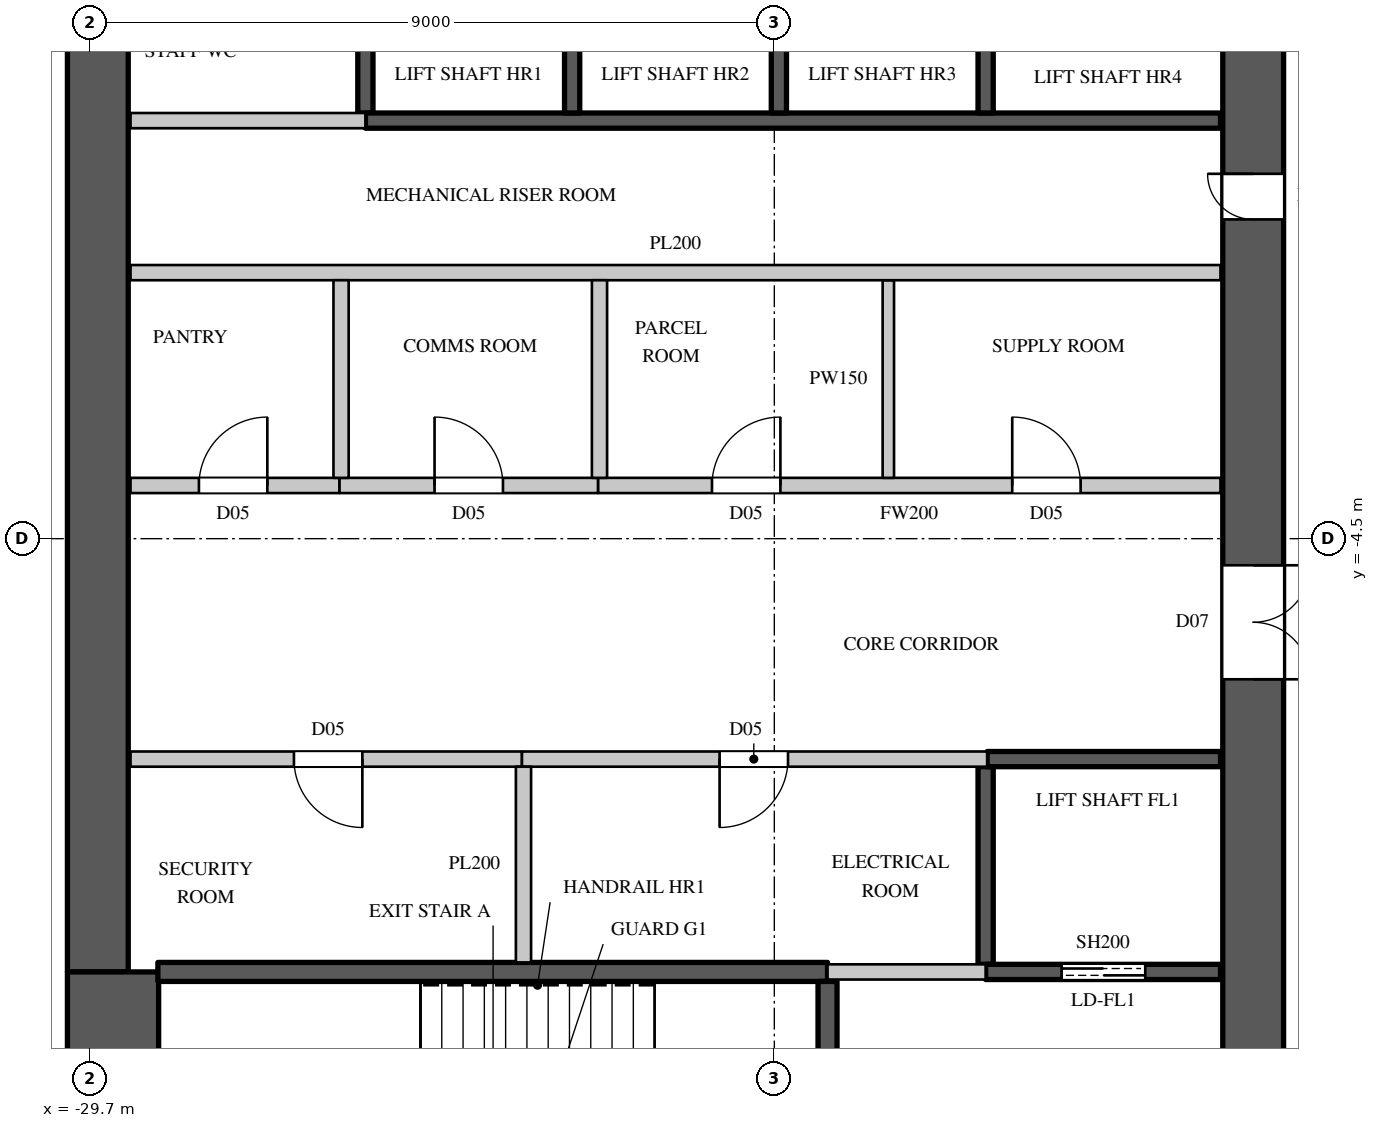
"""IFC4 building model, lengths in metres.
Left out: names, types, materials, properties, quantities, classifications, styles, units other than length and angle.
Written with IfcOpenShell. Run it as: python <this file> out.ifc"""

import sys

from ifc_helpers import new_model, si_unit, direction, frame, frame_2d, origin, place, context, subcontext, project, spatial, rectangle, extrude, element, fill, save


model = new_model("IFC4")
c1 = context("Model", 3, precision=1e-05, world=origin(), true_north=direction((0.0, 1.0)))
c2 = subcontext(c1, "Body", "Model", "MODEL_VIEW")
j1 = project(units=[si_unit("LENGTHUNIT", "METRE"), si_unit("PLANEANGLEUNIT", "RADIAN")], contexts=[c1])
p1 = place(None, origin())
s1 = spatial("IfcSite", under=j1, at=p1, CompositionType="ELEMENT")
p2 = place(p1, origin())
s2 = spatial("IfcBuilding", under=s1, at=p2, CompositionType="ELEMENT")
p3 = place(p2, frame((0.0, 0.0, 193.3)))
s3 = spatial("IfcBuildingStorey", under=s2, at=p3, CompositionType="ELEMENT", Elevation=193.3)
p4 = place(p3, frame((-14.4, -14.8, 0.0), z_axis=(0.0, 0.0, 1.0), x_axis=(0.0, 1.0, 0.0)))
e1 = element("IfcWall", 1, at=p4, inside=s3, PredefinedType="SHEAR", context=c2, shape_type="SweptSolid", body=[
    extrude(rectangle(XDim=29.6, YDim=0.8, at=frame_2d((14.8, 0.0))), origin(), (0.0, 0.0, 1.0), 4.1),
])
p5 = place(p4, frame((1.55, 0.0, 0.0)))
e2 = element("IfcOpeningElement", 2, at=p5, cuts=e1, PredefinedType="OPENING", context=c2, shape_type="SweptSolid", body=[
    extrude(rectangle(XDim=1.5, YDim=2.4, at=frame_2d((0.75, 1.2))), frame((0.0, 0.41, 0.0), z_axis=(0.0, -1.0, 0.0), x_axis=(1.0, 0.0, 0.0)), (0.0, 0.0, 1.0), 0.82),
])
p6 = place(p4, frame((26.55, 0.0, 0.0)))
e3 = element("IfcOpeningElement", 3, at=p6, cuts=e1, PredefinedType="OPENING", context=c2, shape_type="SweptSolid", body=[
    extrude(rectangle(XDim=1.5, YDim=2.4, at=frame_2d((0.75, 1.2))), frame((0.0, 0.41, 0.0), z_axis=(0.0, -1.0, 0.0), x_axis=(1.0, 0.0, 0.0)), (0.0, 0.0, 1.0), 0.82),
])
p7 = place(p4, frame((8.45, 0.0, 0.0)))
e4 = element("IfcOpeningElement", 4, at=p7, cuts=e1, PredefinedType="OPENING", context=c2, shape_type="SweptSolid", body=[
    extrude(rectangle(XDim=1.5, YDim=2.4, at=frame_2d((0.75, 1.2))), frame((0.0, 0.41, 0.0), z_axis=(0.0, -1.0, 0.0), x_axis=(1.0, 0.0, 0.0)), (0.0, 0.0, 1.0), 0.82),
])
p8 = place(p4, frame((19.65, 0.0, 0.0)))
e5 = element("IfcOpeningElement", 5, at=p8, cuts=e1, PredefinedType="OPENING", context=c2, shape_type="SweptSolid", body=[
    extrude(rectangle(XDim=1.5, YDim=2.4, at=frame_2d((0.75, 1.2))), frame((0.0, 0.41, 0.0), z_axis=(0.0, -1.0, 0.0), x_axis=(1.0, 0.0, 0.0)), (0.0, 0.0, 1.0), 0.82),
])
p9 = place(p4, frame((14.5, 0.0, 0.0)))
e6 = element("IfcOpeningElement", 6, at=p9, cuts=e1, PredefinedType="OPENING", context=c2, shape_type="SweptSolid", body=[
    extrude(rectangle(XDim=0.6, YDim=2.0, at=frame_2d((0.3, 1.0))), frame((0.0, 0.41, 0.0), z_axis=(0.0, -1.0, 0.0), x_axis=(1.0, 0.0, 0.0)), (0.0, 0.0, 1.0), 0.82),
])
p10 = place(p3, frame((-29.6, -10.2, 0.0), z_axis=(0.0, 0.0, 1.0), x_axis=(0.0, 1.0, 0.0)))
e7 = element("IfcWall", 7, at=p10, inside=s3, PredefinedType="SHEAR", context=c2, shape_type="SweptSolid", body=[
    extrude(rectangle(XDim=20.4, YDim=0.8, at=frame_2d((10.2, 0.0))), origin(), (0.0, 0.0, 1.0), 4.1),
])
p11 = place(p3, frame((-29.4, -14.8, 0.0), z_axis=(0.0, 0.0, 1.0), x_axis=(0.0, 1.0, 0.0)))
e8 = element("IfcWall", 8, at=p11, inside=s3, PredefinedType="SHEAR", context=c2, shape_type="SweptSolid", body=[
    extrude(rectangle(XDim=4.6, YDim=1.2, at=frame_2d((2.3, 0.0))), origin(), (0.0, 0.0, 1.0), 4.1),
])
p12 = place(p3, frame((-29.17, -7.4, 0.0), z_axis=(0.0, 0.0, 1.0), x_axis=(1.0, 0.0, 0.0)))
e9 = element("IfcWall", 9, at=p12, inside=s3, PredefinedType="PARTITIONING", context=c2, shape_type="SweptSolid", body=[
    extrude(rectangle(XDim=5.15, YDim=0.2, at=frame_2d((2.575, 0.0))), origin(), (0.0, 0.0, 1.0), 3.8),
])
p13 = place(p12, frame((2.15, 0.0, 0.0)))
e10 = element("IfcOpeningElement", 10, at=p13, cuts=e9, PredefinedType="OPENING", context=c2, shape_type="SweptSolid", body=[
    extrude(rectangle(XDim=0.9, YDim=2.2, at=frame_2d((0.45, 1.1))), frame((0.0, 0.11, 0.0), z_axis=(0.0, -1.0, 0.0), x_axis=(1.0, 0.0, 0.0)), (0.0, 0.0, 1.0), 0.22),
])
p14 = place(p3, frame((-29.17, -3.8, 0.0), z_axis=(0.0, 0.0, 1.0), x_axis=(1.0, 0.0, 0.0)))
e11 = element("IfcWall", 11, at=p14, inside=s3, PredefinedType="PARTITIONING", context=c2, shape_type="SweptSolid", body=[
    extrude(rectangle(XDim=2.75, YDim=0.2, at=frame_2d((1.375, 0.0))), origin(), (0.0, 0.0, 1.0), 3.8),
])
p15 = place(p14, frame((0.9, 0.0, 0.0)))
e12 = element("IfcOpeningElement", 12, at=p15, cuts=e11, PredefinedType="OPENING", context=c2, shape_type="SweptSolid", body=[
    extrude(rectangle(XDim=0.9, YDim=2.2, at=frame_2d((0.45, 1.1))), frame((0.0, 0.11, 0.0), z_axis=(0.0, -1.0, 0.0), x_axis=(1.0, 0.0, 0.0)), (0.0, 0.0, 1.0), 0.22),
])
p16 = place(p3, frame((-23.02, -3.8, 0.0), z_axis=(0.0, 0.0, 1.0), x_axis=(1.0, 0.0, 0.0)))
e13 = element("IfcWall", 13, at=p16, inside=s3, PredefinedType="PARTITIONING", context=c2, shape_type="SweptSolid", body=[
    extrude(rectangle(XDim=8.19, YDim=0.2, at=frame_2d((4.095, 0.0))), origin(), (0.0, 0.0, 1.0), 3.8),
])
p17 = place(p16, frame((1.5, 0.0, 0.0)))
e14 = element("IfcOpeningElement", 14, at=p17, cuts=e13, PredefinedType="OPENING", context=c2, shape_type="SweptSolid", body=[
    extrude(rectangle(XDim=0.9, YDim=2.2, at=frame_2d((0.45, 1.1))), frame((0.0, 0.11, 0.0), z_axis=(0.0, -1.0, 0.0), x_axis=(1.0, 0.0, 0.0)), (0.0, 0.0, 1.0), 0.22),
])
p18 = place(p16, frame((5.45, 0.0, 0.0)))
e15 = element("IfcOpeningElement", 15, at=p18, cuts=e13, PredefinedType="OPENING", context=c2, shape_type="SweptSolid", body=[
    extrude(rectangle(XDim=0.9, YDim=2.2, at=frame_2d((0.45, 1.1))), frame((0.0, 0.11, 0.0), z_axis=(0.0, -1.0, 0.0), x_axis=(1.0, 0.0, 0.0)), (0.0, 0.0, 1.0), 0.22),
])
p19 = place(p3, frame((-19.2, -3.7, 0.0), z_axis=(0.0, 0.0, 1.0), x_axis=(0.0, 1.0, 0.0)))
e16 = element("IfcWall", 16, at=p19, inside=s3, PredefinedType="PARTITIONING", context=c2, shape_type="SweptSolid", body=[
    extrude(rectangle(XDim=2.6, YDim=0.15, at=frame_2d((1.3, 0.0))), origin(), (0.0, 0.0, 1.0), 3.8),
])
p20 = place(p3, frame((-29.17, -1.0, 0.0), z_axis=(0.0, 0.0, 1.0), x_axis=(1.0, 0.0, 0.0)))
e17 = element("IfcWall", 17, at=p20, inside=s3, PredefinedType="PARTITIONING", context=c2, shape_type="SweptSolid", body=[
    extrude(rectangle(XDim=14.34, YDim=0.2, at=frame_2d((7.17, 0.0))), origin(), (0.0, 0.0, 1.0), 3.8),
])
p21 = place(p3, frame((-29.17, 1.0, 0.0), z_axis=(0.0, 0.0, 1.0), x_axis=(1.0, 0.0, 0.0)))
e18 = element("IfcWall", 18, at=p21, inside=s3, PredefinedType="PARTITIONING", context=c2, shape_type="SweptSolid", body=[
    extrude(rectangle(XDim=3.09, YDim=0.2, at=frame_2d((1.545, 0.0))), origin(), (0.0, 0.0, 1.0), 3.8),
])
p22 = place(p3, frame((-26.42, -3.8, 0.0), z_axis=(0.0, 0.0, 1.0), x_axis=(1.0, 0.0, 0.0)))
e19 = element("IfcWall", 19, at=p22, inside=s3, PredefinedType="PARTITIONING", context=c2, shape_type="SweptSolid", body=[
    extrude(rectangle(XDim=3.4, YDim=0.2, at=frame_2d((1.7, 0.0))), origin(), (0.0, 0.0, 1.0), 3.8),
])
p23 = place(p22, frame((1.25, 0.0, 0.0)))
e20 = element("IfcOpeningElement", 20, at=p23, cuts=e19, PredefinedType="OPENING", context=c2, shape_type="SweptSolid", body=[
    extrude(rectangle(XDim=0.9, YDim=2.2, at=frame_2d((0.45, 1.1))), frame((0.0, 0.11, 0.0), z_axis=(0.0, -1.0, 0.0), x_axis=(1.0, 0.0, 0.0)), (0.0, 0.0, 1.0), 0.22),
])
p24 = place(p3, frame((-26.4, -3.7, 0.0), z_axis=(0.0, 0.0, 1.0), x_axis=(0.0, 1.0, 0.0)))
e21 = element("IfcWall", 21, at=p24, inside=s3, PredefinedType="PARTITIONING", context=c2, shape_type="SweptSolid", body=[
    extrude(rectangle(XDim=2.6, YDim=0.2, at=frame_2d((1.3, 0.0))), origin(), (0.0, 0.0, 1.0), 3.8),
])
p25 = place(p3, frame((-24.02, -7.4, 0.0), z_axis=(0.0, 0.0, 1.0), x_axis=(1.0, 0.0, 0.0)))
e22 = element("IfcWall", 22, at=p25, inside=s3, PredefinedType="PARTITIONING", context=c2, shape_type="SweptSolid", body=[
    extrude(rectangle(XDim=6.12, YDim=0.2, at=frame_2d((3.06, 0.0))), origin(), (0.0, 0.0, 1.0), 3.8),
])
p26 = place(p25, frame((2.6, 0.0, 0.0)))
e23 = element("IfcOpeningElement", 23, at=p26, cuts=e22, PredefinedType="OPENING", context=c2, shape_type="SweptSolid", body=[
    extrude(rectangle(XDim=0.9, YDim=2.2, at=frame_2d((0.45, 1.1))), frame((0.0, 0.11, 0.0), z_axis=(0.0, -1.0, 0.0), x_axis=(1.0, 0.0, 0.0)), (0.0, 0.0, 1.0), 0.22),
])
p27 = place(p3, frame((-24.0, -10.075, 0.0), z_axis=(0.0, 0.0, 1.0), x_axis=(0.0, 1.0, 0.0)))
e24 = element("IfcWall", 24, at=p27, inside=s3, PredefinedType="PARTITIONING", context=c2, shape_type="SweptSolid", body=[
    extrude(rectangle(XDim=2.575, YDim=0.2, at=frame_2d((1.288, 0.0))), origin(), (0.0, 0.0, 1.0), 3.8),
])
p28 = place(p3, frame((-23.0, -3.7, 0.0), z_axis=(0.0, 0.0, 1.0), x_axis=(0.0, 1.0, 0.0)))
e25 = element("IfcWall", 25, at=p28, inside=s3, PredefinedType="PARTITIONING", context=c2, shape_type="SweptSolid", body=[
    extrude(rectangle(XDim=2.6, YDim=0.2, at=frame_2d((1.3, 0.0))), origin(), (0.0, 0.0, 1.0), 3.8),
])
p29 = place(p3, frame((-20.0, -10.2, 0.0), z_axis=(0.0, 0.0, 1.0), x_axis=(1.0, 0.0, 0.0)))
e26 = element("IfcWall", 26, at=p29, inside=s3, PredefinedType="PARTITIONING", context=c2, shape_type="SweptSolid", body=[
    extrude(rectangle(XDim=2.08, YDim=0.2, at=frame_2d((1.04, 0.0))), origin(), (0.0, 0.0, 1.0), 3.8),
])
p30 = place(p3, frame((-26.08, 1.1, 0.0), z_axis=(0.0, 0.0, 1.0), x_axis=(0.0, 1.0, 0.0)))
e27 = element("IfcWall", 27, at=p30, inside=s3, PredefinedType="SHEAR", context=c2, shape_type="SweptSolid", body=[
    extrude(rectangle(XDim=2.6, YDim=0.2, at=frame_2d((1.3, 0.0))), origin(), (0.0, 0.0, 1.0), 3.8),
])
p31 = place(p3, frame((-26.08, 1.0, 0.0), z_axis=(0.0, 0.0, 1.0), x_axis=(1.0, 0.0, 0.0)))
e28 = element("IfcWall", 28, at=p31, inside=s3, PredefinedType="SHEAR", context=c2, shape_type="SweptSolid", body=[
    extrude(rectangle(XDim=11.25, YDim=0.2, at=frame_2d((5.625, 0.0))), origin(), (0.0, 0.0, 1.0), 3.8),
])
for number, where, z_axis, x_axis in (
    (29, (-23.36, 1.1, 0.0), (0.0, 0.0, 1.0), (0.0, 1.0, 0.0)),
    (30, (-20.64, 1.1, 0.0), (0.0, 0.0, 1.0), (0.0, 1.0, 0.0)),
):
    element("IfcWall", number, at=place(p3, frame(where, z_axis=z_axis, x_axis=x_axis)), inside=s3, PredefinedType="SHEAR", context=c2, shape_type="SweptSolid", body=[
        extrude(rectangle(XDim=2.6, YDim=0.2, at=frame_2d((1.3, 0.0))), origin(), (0.0, 0.0, 1.0), 4.1),
    ])
p32 = place(p3, frame((-17.92, -10.1, 0.0), z_axis=(0.0, 0.0, 1.0), x_axis=(0.0, 1.0, 0.0)))
e31 = element("IfcWall", 31, at=p32, inside=s3, PredefinedType="SHEAR", context=c2, shape_type="SweptSolid", body=[
    extrude(rectangle(XDim=2.6, YDim=0.2, at=frame_2d((1.3, 0.0))), origin(), (0.0, 0.0, 1.0), 3.8),
])
p33 = place(p3, frame((-17.92, -10.2, 0.0), z_axis=(0.0, 0.0, 1.0), x_axis=(1.0, 0.0, 0.0)))
e32 = element("IfcWall", 32, at=p33, inside=s3, PredefinedType="SHEAR", context=c2, shape_type="SweptSolid", body=[
    extrude(rectangle(XDim=3.09, YDim=0.2, at=frame_2d((1.545, 0.0))), origin(), (0.0, 0.0, 1.0), 3.8),
])
p34 = place(p33, frame((1.0, 0.0, 0.0)))
e33 = element("IfcOpeningElement", 33, at=p34, cuts=e32, PredefinedType="OPENING", context=c2, shape_type="SweptSolid", body=[
    extrude(rectangle(XDim=1.1, YDim=2.2, at=frame_2d((0.55, 1.1))), frame((0.0, 0.11, 0.0), z_axis=(0.0, -1.0, 0.0), x_axis=(1.0, 0.0, 0.0)), (0.0, 0.0, 1.0), 0.22),
])
p35 = place(p3, frame((-17.9, -7.4, 0.0), z_axis=(0.0, 0.0, 1.0), x_axis=(1.0, 0.0, 0.0)))
e34 = element("IfcWall", 34, at=p35, inside=s3, PredefinedType="SHEAR", context=c2, shape_type="SweptSolid", body=[
    extrude(rectangle(XDim=3.07, YDim=0.2, at=frame_2d((1.535, 0.0))), origin(), (0.0, 0.0, 1.0), 3.8),
])
p36 = place(p3, frame((-17.92, 1.1, 0.0), z_axis=(0.0, 0.0, 1.0), x_axis=(0.0, 1.0, 0.0)))
e35 = element("IfcWall", 35, at=p36, inside=s3, PredefinedType="SHEAR", context=c2, shape_type="SweptSolid", body=[
    extrude(rectangle(XDim=2.6, YDim=0.2, at=frame_2d((1.3, 0.0))), origin(), (0.0, 0.0, 1.0), 4.1),
])
p37 = place(p3, frame((-28.81, -10.2, 0.0), z_axis=(0.0, 0.0, 1.0), x_axis=(1.0, 0.0, 0.0)))
e36 = element("IfcWall", 36, at=p37, inside=s3, PredefinedType="SHEAR", context=c2, shape_type="SweptSolid", body=[
    extrude(rectangle(XDim=8.81, YDim=0.25, at=frame_2d((4.405, 0.0))), origin(), (0.0, 0.0, 1.0), 3.8),
])
p38 = place(p3, frame((-20.0, -14.77, 0.0), z_axis=(0.0, 0.0, 1.0), x_axis=(0.0, 1.0, 0.0)))
e37 = element("IfcWall", 37, at=p38, inside=s3, PredefinedType="SHEAR", context=c2, shape_type="SweptSolid", body=[
    extrude(rectangle(XDim=4.445, YDim=0.25, at=frame_2d((2.223, 0.0))), origin(), (0.0, 0.0, 1.0), 3.8),
])
p39 = place(p38, frame((1.7, 0.0, 0.0)))
e38 = element("IfcOpeningElement", 38, at=p39, cuts=e37, PredefinedType="OPENING", context=c2, shape_type="SweptSolid", body=[
    extrude(rectangle(XDim=1.1, YDim=2.2, at=frame_2d((0.55, 1.1))), frame((0.0, 0.135, 0.0), z_axis=(0.0, -1.0, 0.0), x_axis=(1.0, 0.0, 0.0)), (0.0, 0.0, 1.0), 0.27),
])
p40 = place(p13, origin())
e39 = element("IfcDoor", 39, at=p40, inside=s3, OperationType="SINGLE_SWING_LEFT", PredefinedType="DOOR", context=c2, shape_type="SweptSolid", body=[
    extrude(rectangle(XDim=0.9, YDim=2.2, at=frame_2d((0.45, 1.1))), frame((0.0, 0.025, 0.0), z_axis=(0.0, -1.0, 0.0), x_axis=(1.0, 0.0, 0.0)), (0.0, 0.0, 1.0), 0.05),
])
fill(e10, e39)
p41 = place(p26, origin())
e40 = element("IfcDoor", 40, at=p41, inside=s3, OperationType="SINGLE_SWING_RIGHT", PredefinedType="DOOR", context=c2, shape_type="SweptSolid", body=[
    extrude(rectangle(XDim=0.9, YDim=2.2, at=frame_2d((0.45, 1.1))), frame((0.0, 0.025, 0.0), z_axis=(0.0, -1.0, 0.0), x_axis=(1.0, 0.0, 0.0)), (0.0, 0.0, 1.0), 0.05),
])
fill(e23, e40)
p42 = place(p15, origin())
e41 = element("IfcDoor", 41, at=p42, inside=s3, OperationType="SINGLE_SWING_RIGHT", PredefinedType="DOOR", context=c2, shape_type="SweptSolid", body=[
    extrude(rectangle(XDim=0.9, YDim=2.2, at=frame_2d((0.45, 1.1))), frame((0.0, 0.025, 0.0), z_axis=(0.0, -1.0, 0.0), x_axis=(1.0, 0.0, 0.0)), (0.0, 0.0, 1.0), 0.05),
])
fill(e12, e41)
p43 = place(p23, origin())
e42 = element("IfcDoor", 42, at=p43, inside=s3, OperationType="SINGLE_SWING_LEFT", PredefinedType="DOOR", context=c2, shape_type="SweptSolid", body=[
    extrude(rectangle(XDim=0.9, YDim=2.2, at=frame_2d((0.45, 1.1))), frame((0.0, 0.025, 0.0), z_axis=(0.0, -1.0, 0.0), x_axis=(1.0, 0.0, 0.0)), (0.0, 0.0, 1.0), 0.05),
])
fill(e20, e42)
p44 = place(p17, origin())
e43 = element("IfcDoor", 43, at=p44, inside=s3, OperationType="SINGLE_SWING_RIGHT", PredefinedType="DOOR", context=c2, shape_type="SweptSolid", body=[
    extrude(rectangle(XDim=0.9, YDim=2.2, at=frame_2d((0.45, 1.1))), frame((0.0, 0.025, 0.0), z_axis=(0.0, -1.0, 0.0), x_axis=(1.0, 0.0, 0.0)), (0.0, 0.0, 1.0), 0.05),
])
fill(e14, e43)
p45 = place(p18, origin())
e44 = element("IfcDoor", 44, at=p45, inside=s3, OperationType="SINGLE_SWING_LEFT", PredefinedType="DOOR", context=c2, shape_type="SweptSolid", body=[
    extrude(rectangle(XDim=0.9, YDim=2.2, at=frame_2d((0.45, 1.1))), frame((0.0, 0.025, 0.0), z_axis=(0.0, -1.0, 0.0), x_axis=(1.0, 0.0, 0.0)), (0.0, 0.0, 1.0), 0.05),
])
fill(e15, e44)
p46 = place(p34, origin())
e45 = element("IfcDoor", 45, at=p46, inside=s3, OperationType="DOUBLE_DOOR_SLIDING", PredefinedType="DOOR", context=c2, shape_type="SweptSolid", body=[
    extrude(rectangle(XDim=1.1, YDim=2.2, at=frame_2d((0.55, 1.1))), frame((0.0, 0.025, 0.0), z_axis=(0.0, -1.0, 0.0), x_axis=(1.0, 0.0, 0.0)), (0.0, 0.0, 1.0), 0.05),
])
fill(e33, e45)
p47 = place(p7, origin())
e46 = element("IfcDoor", 46, at=p47, inside=s3, OperationType="DOUBLE_DOOR_SINGLE_SWING", PredefinedType="DOOR", context=c2, shape_type="SweptSolid", body=[
    extrude(rectangle(XDim=1.5, YDim=2.4, at=frame_2d((0.75, 1.2))), frame((0.0, -0.345, 0.0), z_axis=(0.0, -1.0, 0.0), x_axis=(1.0, 0.0, 0.0)), (0.0, 0.0, 1.0), 0.05),
])
fill(e4, e46)
p48 = place(p9, origin())
e47 = element("IfcDoor", 47, at=p48, inside=s3, OperationType="SINGLE_SWING_RIGHT", PredefinedType="DOOR", context=c2, shape_type="SweptSolid", body=[
    extrude(rectangle(XDim=0.6, YDim=2.0, at=frame_2d((0.3, 1.0))), frame((0.0, 0.395, 0.0), z_axis=(0.0, -1.0, 0.0), x_axis=(1.0, 0.0, 0.0)), (0.0, 0.0, 1.0), 0.05),
])
fill(e6, e47)
save(model, sys.argv[1])
